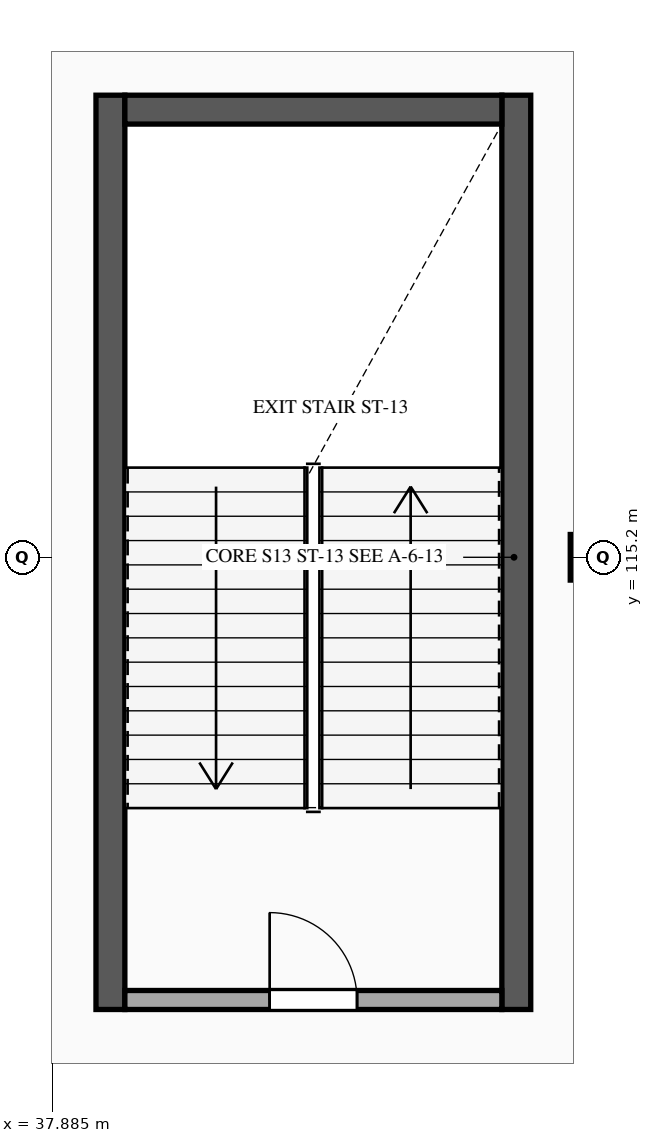
"""IFC4 building model, lengths in metres.
Left out: names, types, materials, properties, quantities, classifications, styles, units other than length and angle.
Written with IfcOpenShell. Run it as: python <this file> out.ifc"""

import sys

from ifc_helpers import new_model, si_unit, direction, frame, frame_2d, origin, origin_2d, place, context, subcontext, project, spatial, rectangle, extrude, element, fill, save


model = new_model("IFC4")
c1 = context("Model", 3, precision=1e-05, world=origin(), true_north=direction((0.0, 1.0)))
c2 = subcontext(c1, "Body", "Model", "MODEL_VIEW")
j1 = project(units=[si_unit("LENGTHUNIT", "METRE"), si_unit("PLANEANGLEUNIT", "RADIAN")], contexts=[c1])
p1 = place(None, origin())
s1 = spatial("IfcSite", under=j1, at=p1, CompositionType="ELEMENT")
p2 = place(p1, origin())
s2 = spatial("IfcBuilding", under=s1, at=p2, CompositionType="ELEMENT")
p3 = place(p2, frame((0.0, 0.0, 15.3)))
s3 = spatial("IfcBuildingStorey", under=s2, at=p3, CompositionType="ELEMENT", Elevation=15.3)
p4 = place(p3, frame((45.0, 115.2, 0.0), z_axis=(0.0, 0.0, 1.0), x_axis=(1.0, 0.0, 0.0)))
e1 = element("IfcColumn", 1, at=p4, inside=s3, PredefinedType="COLUMN", context=c2, shape_type="SweptSolid", body=[
    extrude(rectangle(XDim=0.6, YDim=0.6, at=origin_2d()), origin(), (0.0, 0.0, 1.0), 4.5),
])
for number, where, z_axis, x_axis in (
    (2, (38.65, 109.25, 0.0), (0.0, 0.0, 1.0), (0.0, 1.0, 0.0)),
    (3, (43.99, 121.28, 0.0), (0.0, 0.0, 1.0), (0.0, -1.0, 0.0)),
):
    element("IfcWall", number, at=place(p3, frame(where, z_axis=z_axis, x_axis=x_axis)), inside=s3, PredefinedType="SHEAR", context=c2, shape_type="SweptSolid", body=[
        extrude(rectangle(XDim=12.03, YDim=0.38, at=frame_2d((6.015, 0.0))), origin(), (0.0, 0.0, 1.0), 4.25),
    ])
p5 = place(p3, frame((38.84, 121.09, 0.0), z_axis=(0.0, 0.0, 1.0), x_axis=(1.0, 0.0, 0.0)))
e4 = element("IfcWall", 4, at=p5, inside=s3, PredefinedType="SHEAR", context=c2, shape_type="SweptSolid", body=[
    extrude(rectangle(XDim=4.96, YDim=0.38, at=frame_2d((2.48, 0.0))), origin(), (0.0, 0.0, 1.0), 4.25),
])
p6 = place(p3, frame((38.84, 109.375, 0.0), z_axis=(0.0, 0.0, 1.0), x_axis=(1.0, 0.0, 0.0)))
e5 = element("IfcWall", 5, at=p6, inside=s3, PredefinedType="STANDARD", context=c2, shape_type="SweptSolid", body=[
    extrude(rectangle(XDim=4.96, YDim=0.25, at=frame_2d((2.48, 0.0))), origin(), (0.0, 0.0, 1.0), 4.25),
])
p7 = place(p6, frame((1.905, 0.0, 0.0)))
e6 = element("IfcOpeningElement", 6, at=p7, cuts=e5, PredefinedType="OPENING", context=c2, shape_type="SweptSolid", body=[
    extrude(rectangle(XDim=1.15, YDim=2.2, at=frame_2d((0.575, 1.1))), frame((0.0, 0.135, 0.0), z_axis=(0.0, -1.0, 0.0), x_axis=(1.0, 0.0, 0.0)), (0.0, 0.0, 1.0), 0.27),
])
p8 = place(p7, origin())
e7 = element("IfcDoor", 7, at=p8, inside=s3, OperationType="SINGLE_SWING_LEFT", PredefinedType="DOOR", context=c2, shape_type="SweptSolid", body=[
    extrude(rectangle(XDim=1.15, YDim=2.2, at=frame_2d((0.575, 1.1))), frame((0.0, 0.025, 0.0), z_axis=(0.0, -1.0, 0.0), x_axis=(1.0, 0.0, 0.0)), (0.0, 0.0, 1.0), 0.05),
])
fill(e6, e7)
save(model, sys.argv[1])
